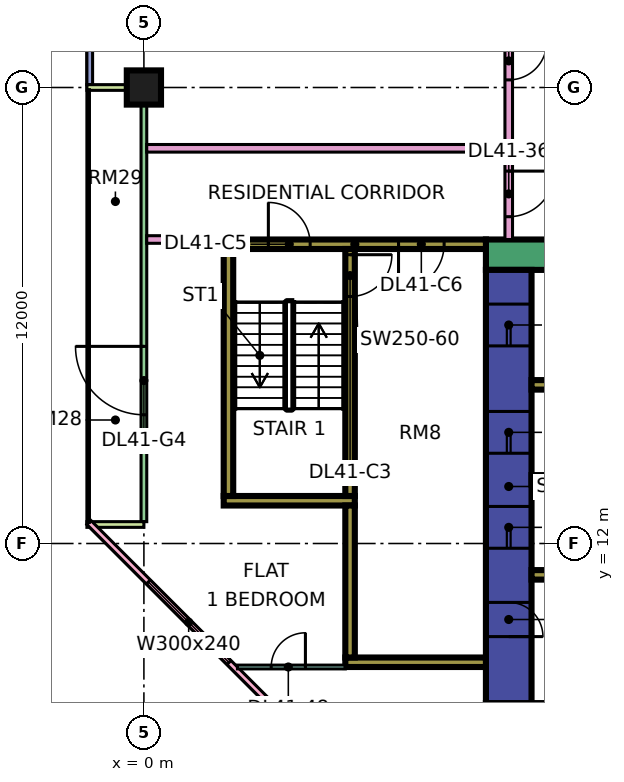
"""IFC4 building model, lengths in metres.
Left out: names, types, materials, properties, quantities, classifications, styles, units other than length and angle.
Written with IfcOpenShell. Run it as: python <this file> out.ifc"""

import sys

from ifc_helpers import new_model, si_unit, direction, frame, frame_2d, origin, origin_2d, place, context, subcontext, project, spatial, rectangle, extrude, element, fill, save


model = new_model("IFC4")
c1 = context("Model", 3, precision=1e-05, world=origin(), true_north=direction((0.0, 1.0)))
c2 = subcontext(c1, "Body", "Model", "MODEL_VIEW")
j1 = project(units=[si_unit("LENGTHUNIT", "METRE"), si_unit("PLANEANGLEUNIT", "RADIAN")], contexts=[c1])
p1 = place(None, origin())
s1 = spatial("IfcSite", under=j1, at=p1, CompositionType="ELEMENT")
p2 = place(p1, origin())
s2 = spatial("IfcBuilding", under=s1, at=p2, CompositionType="ELEMENT")
p3 = place(p2, frame((0.0, 0.0, 179.9)))
s3 = spatial("IfcBuildingStorey", under=s2, at=p3, CompositionType="ELEMENT", Elevation=179.9)
p4 = place(p3, frame((0.0, 24.0, 0.0), z_axis=(0.0, 0.0, 1.0), x_axis=(1.0, 0.0, 0.0)))
e1 = element("IfcColumn", 1, at=p4, inside=s3, PredefinedType="COLUMN", context=c2, shape_type="SweptSolid", body=[
    extrude(rectangle(XDim=0.9, YDim=0.9, at=origin_2d()), origin(), (0.0, 0.0, 1.0), 3.75),
])
p5 = place(p3, frame((9.0, 19.6, 0.0), z_axis=(0.0, 0.0, 1.0), x_axis=(1.0, 0.0, 0.0)))
e2 = element("IfcWall", 2, at=p5, inside=s3, PredefinedType="SHEAR", context=c2, shape_type="SweptSolid", body=[
    extrude(rectangle(XDim=25.0, YDim=0.8, at=frame_2d((12.5, 0.0))), origin(), (0.0, 0.0, 1.0), 3.75),
])
p6 = place(p5, frame((19.1, 0.0, 0.0)))
e3 = element("IfcOpeningElement", 3, at=p6, cuts=e2, PredefinedType="OPENING", context=c2, shape_type="SweptSolid", body=[
    extrude(rectangle(XDim=1.8, YDim=2.4, at=frame_2d((0.9, 1.2))), frame((0.0, 0.41, 0.0), z_axis=(0.0, -1.0, 0.0), x_axis=(1.0, 0.0, 0.0)), (0.0, 0.0, 1.0), 0.82),
])
p7 = place(p3, frame((9.6, 7.8, 0.0), z_axis=(0.0, 0.0, 1.0), x_axis=(0.0, 1.0, 0.0)))
e4 = element("IfcWall", 4, at=p7, inside=s3, PredefinedType="SHEAR", context=c2, shape_type="SweptSolid", body=[
    extrude(rectangle(XDim=11.4, YDim=1.2, at=frame_2d((5.7, 0.0))), origin(), (0.0, 0.0, 1.0), 3.75),
])
p8 = place(p7, frame((4.075, 0.0, 0.0)))
e5 = element("IfcOpeningElement", 5, at=p8, cuts=e4, PredefinedType="OPENING", context=c2, shape_type="SweptSolid", body=[
    extrude(rectangle(XDim=1.1, YDim=2.2, at=frame_2d((0.55, 1.1))), frame((0.0, 0.61, 0.0), z_axis=(0.0, -1.0, 0.0), x_axis=(1.0, 0.0, 0.0)), (0.0, 0.0, 1.0), 1.22),
])
p9 = place(p7, frame((6.575, 0.0, 0.0)))
e6 = element("IfcOpeningElement", 6, at=p9, cuts=e4, PredefinedType="OPENING", context=c2, shape_type="SweptSolid", body=[
    extrude(rectangle(XDim=1.1, YDim=2.2, at=frame_2d((0.55, 1.1))), frame((0.0, 0.61, 0.0), z_axis=(0.0, -1.0, 0.0), x_axis=(1.0, 0.0, 0.0)), (0.0, 0.0, 1.0), 1.22),
])
p10 = place(p7, frame((9.4, 0.0, 0.0)))
e7 = element("IfcOpeningElement", 7, at=p10, cuts=e4, PredefinedType="OPENING", context=c2, shape_type="SweptSolid", body=[
    extrude(rectangle(XDim=1.1, YDim=2.2, at=frame_2d((0.55, 1.1))), frame((0.0, 0.61, 0.0), z_axis=(0.0, -1.0, 0.0), x_axis=(1.0, 0.0, 0.0)), (0.0, 0.0, 1.0), 1.22),
])
p11 = place(p7, frame((1.75, 0.0, 0.0)))
e8 = element("IfcOpeningElement", 8, at=p11, cuts=e4, PredefinedType="OPENING", context=c2, shape_type="SweptSolid", body=[
    extrude(rectangle(XDim=0.9, YDim=2.1, at=frame_2d((0.45, 1.05))), frame((0.0, 0.61, 0.0), z_axis=(0.0, -1.0, 0.0), x_axis=(1.0, 0.0, 0.0)), (0.0, 0.0, 1.0), 1.22),
])
for number, where, z_axis, x_axis in (
    (9, (10.2, 11.175, 0.0), (0.0, 0.0, 1.0), (1.0, 0.0, 0.0)),
    (10, (10.2, 13.675, 0.0), (0.0, 0.0, 1.0), (1.0, 0.0, 0.0)),
    (11, (10.2, 16.175, 0.0), (0.0, 0.0, 1.0), (1.0, 0.0, 0.0)),
):
    element("IfcWall", number, at=place(p3, frame(where, z_axis=z_axis, x_axis=x_axis)), inside=s3, PredefinedType="SHEAR", context=c2, shape_type="SweptSolid", body=[
        extrude(rectangle(XDim=3.0, YDim=0.25, at=frame_2d((1.5, 0.0))), origin(), (0.0, 0.0, 1.0), 3.75),
    ])
p12 = place(p3, frame((2.1, 19.875, 0.0), z_axis=(0.0, 0.0, 1.0), x_axis=(1.0, 0.0, 0.0)))
e12 = element("IfcWall", 12, at=p12, inside=s3, PredefinedType="SHEAR", context=c2, shape_type="SweptSolid", body=[
    extrude(rectangle(XDim=6.9, YDim=0.25, at=frame_2d((3.45, 0.0))), origin(), (0.0, 0.0, 1.0), 3.75),
])
p13 = place(p12, frame((1.175, 0.0, 0.0)))
e13 = element("IfcOpeningElement", 13, at=p13, cuts=e12, PredefinedType="OPENING", context=c2, shape_type="SweptSolid", body=[
    extrude(rectangle(XDim=1.1, YDim=2.2, at=frame_2d((0.55, 1.1))), frame((0.0, 0.135, 0.0), z_axis=(0.0, -1.0, 0.0), x_axis=(1.0, 0.0, 0.0)), (0.0, 0.0, 1.0), 0.27),
])
p14 = place(p12, frame((4.6, 0.0, 0.0)))
e14 = element("IfcOpeningElement", 14, at=p14, cuts=e12, PredefinedType="OPENING", context=c2, shape_type="SweptSolid", body=[
    extrude(rectangle(XDim=1.2, YDim=2.2, at=frame_2d((0.6, 1.1))), frame((0.0, 0.135, 0.0), z_axis=(0.0, -1.0, 0.0), x_axis=(1.0, 0.0, 0.0)), (0.0, 0.0, 1.0), 0.27),
])
p15 = place(p3, frame((2.1, 13.125, 0.0), z_axis=(0.0, 0.0, 1.0), x_axis=(1.0, 0.0, 0.0)))
e15 = element("IfcWall", 15, at=p15, inside=s3, PredefinedType="SHEAR", context=c2, shape_type="SweptSolid", body=[
    extrude(rectangle(XDim=3.45, YDim=0.25, at=frame_2d((1.725, 0.0))), origin(), (0.0, 0.0, 1.0), 3.75),
])
p16 = place(p3, frame((2.225, 13.25, 0.0), z_axis=(0.0, 0.0, 1.0), x_axis=(0.0, 1.0, 0.0)))
e16 = element("IfcWall", 16, at=p16, inside=s3, PredefinedType="SHEAR", context=c2, shape_type="SweptSolid", body=[
    extrude(rectangle(XDim=6.5, YDim=0.25, at=frame_2d((3.25, 0.0))), origin(), (0.0, 0.0, 1.0), 3.75),
])
p17 = place(p3, frame((5.425, 13.25, 0.0), z_axis=(0.0, 0.0, 1.0), x_axis=(0.0, 1.0, 0.0)))
e17 = element("IfcWall", 17, at=p17, inside=s3, PredefinedType="SHEAR", context=c2, shape_type="SweptSolid", body=[
    extrude(rectangle(XDim=6.5, YDim=0.25, at=frame_2d((3.25, 0.0))), origin(), (0.0, 0.0, 1.0), 3.75),
])
p18 = place(p17, frame((5.25, 0.0, 0.0)))
e18 = element("IfcOpeningElement", 18, at=p18, cuts=e17, PredefinedType="OPENING", context=c2, shape_type="SweptSolid", body=[
    extrude(rectangle(XDim=1.1, YDim=2.2, at=frame_2d((0.55, 1.1))), frame((0.0, 0.135, 0.0), z_axis=(0.0, -1.0, 0.0), x_axis=(1.0, 0.0, 0.0)), (0.0, 0.0, 1.0), 0.27),
])
p19 = place(p3, frame((5.3, 8.875, 0.0), z_axis=(0.0, 0.0, 1.0), x_axis=(1.0, 0.0, 0.0)))
e19 = element("IfcWall", 19, at=p19, inside=s3, PredefinedType="SHEAR", context=c2, shape_type="SweptSolid", body=[
    extrude(rectangle(XDim=3.7, YDim=0.25, at=frame_2d((1.85, 0.0))), origin(), (0.0, 0.0, 1.0), 3.75),
])
p20 = place(p3, frame((5.425, 9.0, 0.0), z_axis=(0.0, 0.0, 1.0), x_axis=(0.0, 1.0, 0.0)))
e20 = element("IfcWall", 20, at=p20, inside=s3, PredefinedType="SHEAR", context=c2, shape_type="SweptSolid", body=[
    extrude(rectangle(XDim=4.0, YDim=0.25, at=frame_2d((2.0, 0.0))), origin(), (0.0, 0.0, 1.0), 3.75),
])
p21 = place(p3, frame((-1.425, 35.925, 0.0), z_axis=(0.0, 0.0, 1.0), x_axis=(0.0, -1.0, 0.0)))
e21 = element("IfcWall", 21, at=p21, inside=s3, PredefinedType="SOLIDWALL", context=c2, shape_type="SweptSolid", body=[
    extrude(rectangle(XDim=11.85, YDim=0.15, at=frame_2d((5.925, 0.0))), origin(), (0.0, 0.0, 1.0), 3.35),
])
p22 = place(p21, frame((0.562, 0.0, 0.45)))
e22 = element("IfcOpeningElement", 22, at=p22, cuts=e21, PredefinedType="OPENING", context=c2, shape_type="SweptSolid", body=[
    extrude(rectangle(XDim=1.8, YDim=2.4, at=frame_2d((0.9, 1.2))), frame((0.0, 0.085, 0.0), z_axis=(0.0, -1.0, 0.0), x_axis=(1.0, 0.0, 0.0)), (0.0, 0.0, 1.0), 0.17),
])
p23 = place(p21, frame((3.525, 0.0, 0.45)))
e23 = element("IfcOpeningElement", 23, at=p23, cuts=e21, PredefinedType="OPENING", context=c2, shape_type="SweptSolid", body=[
    extrude(rectangle(XDim=1.8, YDim=2.4, at=frame_2d((0.9, 1.2))), frame((0.0, 0.085, 0.0), z_axis=(0.0, -1.0, 0.0), x_axis=(1.0, 0.0, 0.0)), (0.0, 0.0, 1.0), 0.17),
])
p24 = place(p21, frame((7.387, 0.0, 0.45)))
e24 = element("IfcOpeningElement", 24, at=p24, cuts=e21, PredefinedType="OPENING", context=c2, shape_type="SweptSolid", body=[
    extrude(rectangle(XDim=3.0, YDim=2.4, at=frame_2d((1.5, 1.2))), frame((0.0, 0.085, 0.0), z_axis=(0.0, -1.0, 0.0), x_axis=(1.0, 0.0, 0.0)), (0.0, 0.0, 1.0), 0.17),
])
p25 = place(p3, frame((0.0, 23.925, 0.0), z_axis=(0.0, 0.0, 1.0), x_axis=(0.0, -1.0, 0.0)))
e25 = element("IfcWall", 25, at=p25, inside=s3, PredefinedType="SOLIDWALL", context=c2, shape_type="SweptSolid", body=[
    extrude(rectangle(XDim=11.35, YDim=0.15, at=frame_2d((5.675, 0.0))), origin(), (0.0, 0.0, 1.0), 3.35),
])
p26 = place(p25, frame((6.738, 0.0, 0.0)))
e26 = element("IfcOpeningElement", 26, at=p26, cuts=e25, PredefinedType="OPENING", context=c2, shape_type="SweptSolid", body=[
    extrude(rectangle(XDim=1.8, YDim=2.4, at=frame_2d((0.9, 1.2))), frame((0.0, 0.085, 0.0), z_axis=(0.0, -1.0, 0.0), x_axis=(1.0, 0.0, 0.0)), (0.0, 0.0, 1.0), 0.17),
])
for number, where, z_axis, x_axis in (
    (27, (-1.5, 24.0, 0.0), (0.0, 0.0, 1.0), (1.0, 0.0, 0.0)),
    (28, (-1.5, 12.5, 0.0), (0.0, 0.0, 1.0), (1.0, 0.0, 0.0)),
):
    element("IfcWall", number, at=place(p3, frame(where, z_axis=z_axis, x_axis=x_axis)), inside=s3, PredefinedType="SOLIDWALL", context=c2, shape_type="SweptSolid", body=[
        extrude(rectangle(XDim=1.5, YDim=0.15, at=frame_2d((0.75, 0.0))), origin(), (0.0, 0.0, 1.0), 3.35),
    ])
p27 = place(p3, frame((-1.447, 12.553, 0.0), z_axis=(0.0, 0.0, 1.0), x_axis=(0.707106781187, -0.707106781187, 0.0)))
e29 = element("IfcWall", 29, at=p27, inside=s3, PredefinedType="SOLIDWALL", context=c2, shape_type="SweptSolid", body=[
    extrude(rectangle(XDim=19.799, YDim=0.15, at=frame_2d((9.899, 0.0))), origin(), (0.0, 0.0, 1.0), 3.35),
])
p28 = place(p27, frame((2.212, 0.0, 0.45)))
e30 = element("IfcOpeningElement", 30, at=p28, cuts=e29, PredefinedType="OPENING", context=c2, shape_type="SweptSolid", body=[
    extrude(rectangle(XDim=3.0, YDim=2.4, at=frame_2d((1.5, 1.2))), frame((0.0, 0.085, 0.0), z_axis=(0.0, -1.0, 0.0), x_axis=(1.0, 0.0, 0.0)), (0.0, 0.0, 1.0), 0.17),
])
p29 = place(p27, frame((10.216, 0.0, 0.45)))
e31 = element("IfcOpeningElement", 31, at=p29, cuts=e29, PredefinedType="OPENING", context=c2, shape_type="SweptSolid", body=[
    extrude(rectangle(XDim=3.0, YDim=2.4, at=frame_2d((1.5, 1.2))), frame((0.0, 0.085, 0.0), z_axis=(0.0, -1.0, 0.0), x_axis=(1.0, 0.0, 0.0)), (0.0, 0.0, 1.0), 0.17),
])
p30 = place(p3, frame((0.074, 20.0, 0.0), z_axis=(0.0, 0.0, 1.0), x_axis=(1.0, 0.0, 0.0)))
e32 = element("IfcWall", 32, at=p30, inside=s3, PredefinedType="PARTITIONING", context=c2, shape_type="SweptSolid", body=[
    extrude(rectangle(XDim=2.026, YDim=0.2, at=frame_2d((1.013, 0.0))), origin(), (0.0, 0.0, 1.0), 3.35),
])
p31 = place(p3, frame((0.074, 22.4, 0.0), z_axis=(0.0, 0.0, 1.0), x_axis=(1.0, 0.0, 0.0)))
e33 = element("IfcWall", 33, at=p31, inside=s3, PredefinedType="PARTITIONING", context=c2, shape_type="SweptSolid", body=[
    extrude(rectangle(XDim=9.426, YDim=0.2, at=frame_2d((4.713, 0.0))), origin(), (0.0, 0.0, 1.0), 3.35),
])
p32 = place(p3, frame((2.461, 8.75, 0.0), z_axis=(0.0, 0.0, 1.0), x_axis=(1.0, 0.0, 0.0)))
e34 = element("IfcWall", 34, at=p32, inside=s3, PredefinedType="PARTITIONING", context=c2, shape_type="SweptSolid", body=[
    extrude(rectangle(XDim=2.839, YDim=0.1, at=frame_2d((1.419, 0.0))), origin(), (0.0, 0.0, 1.0), 3.35),
])
p33 = place(p32, frame((0.889, 0.0, 0.0)))
e35 = element("IfcOpeningElement", 35, at=p33, cuts=e34, PredefinedType="OPENING", context=c2, shape_type="SweptSolid", body=[
    extrude(rectangle(XDim=0.9, YDim=2.1, at=frame_2d((0.45, 1.05))), frame((0.0, 0.06, 0.0), z_axis=(0.0, -1.0, 0.0), x_axis=(1.0, 0.0, 0.0)), (0.0, 0.0, 1.0), 0.12),
])
p34 = place(p3, frame((9.6, 20.0, 0.0), z_axis=(0.0, 0.0, 1.0), x_axis=(0.0, 1.0, 0.0)))
e36 = element("IfcWall", 36, at=p34, inside=s3, PredefinedType="PARTITIONING", context=c2, shape_type="SweptSolid", body=[
    extrude(rectangle(XDim=44.35, YDim=0.2, at=frame_2d((22.175, 0.0))), origin(), (0.0, 0.0, 1.0), 3.35),
])
p35 = place(p34, frame((16.8, 0.0, 0.0)))
e37 = element("IfcOpeningElement", 37, at=p35, cuts=e36, PredefinedType="OPENING", context=c2, shape_type="SweptSolid", body=[
    extrude(rectangle(XDim=1.0, YDim=2.1, at=frame_2d((0.5, 1.05))), frame((0.0, 0.11, 0.0), z_axis=(0.0, -1.0, 0.0), x_axis=(1.0, 0.0, 0.0)), (0.0, 0.0, 1.0), 0.22),
])
p36 = place(p34, frame((40.65, 0.0, 0.0)))
e38 = element("IfcOpeningElement", 38, at=p36, cuts=e36, PredefinedType="OPENING", context=c2, shape_type="SweptSolid", body=[
    extrude(rectangle(XDim=1.0, YDim=2.1, at=frame_2d((0.5, 1.05))), frame((0.0, 0.11, 0.0), z_axis=(0.0, -1.0, 0.0), x_axis=(1.0, 0.0, 0.0)), (0.0, 0.0, 1.0), 0.22),
])
p37 = place(p34, frame((0.6, 0.0, 0.0)))
e39 = element("IfcOpeningElement", 39, at=p37, cuts=e36, PredefinedType="OPENING", context=c2, shape_type="SweptSolid", body=[
    extrude(rectangle(XDim=1.2, YDim=2.1, at=frame_2d((0.6, 1.05))), frame((0.0, 0.11, 0.0), z_axis=(0.0, -1.0, 0.0), x_axis=(1.0, 0.0, 0.0)), (0.0, 0.0, 1.0), 0.22),
])
p38 = place(p34, frame((4.2, 0.0, 0.0)))
e40 = element("IfcOpeningElement", 40, at=p38, cuts=e36, PredefinedType="OPENING", context=c2, shape_type="SweptSolid", body=[
    extrude(rectangle(XDim=1.0, YDim=2.1, at=frame_2d((0.5, 1.05))), frame((0.0, 0.11, 0.0), z_axis=(0.0, -1.0, 0.0), x_axis=(1.0, 0.0, 0.0)), (0.0, 0.0, 1.0), 0.22),
])
p39 = place(p26, frame((1.8, 0.0, 0.0), z_axis=(0.0, 0.0, 1.0), x_axis=(-1.0, 0.0, 0.0)))
e41 = element("IfcDoor", 41, at=p39, inside=s3, OperationType="DOUBLE_DOOR_SINGLE_SWING", PredefinedType="DOOR", context=c2, shape_type="SweptSolid", body=[
    extrude(rectangle(XDim=1.8, YDim=2.4, at=frame_2d((0.9, 1.2))), frame((0.0, 0.025, 0.0), z_axis=(0.0, -1.0, 0.0), x_axis=(1.0, 0.0, 0.0)), (0.0, 0.0, 1.0), 0.05),
])
fill(e26, e41)
p40 = place(p28, origin())
e42 = element("IfcWindow", 42, at=p40, inside=s3, PartitioningType="SINGLE_PANEL", PredefinedType="WINDOW", context=c2, shape_type="SweptSolid", body=[
    extrude(rectangle(XDim=3.0, YDim=2.4, at=frame_2d((1.5, 1.2))), frame((0.0, 0.03, 0.0), z_axis=(0.0, -1.0, 0.0), x_axis=(1.0, 0.0, 0.0)), (0.0, 0.0, 1.0), 0.06),
])
fill(e30, e42)
p41 = place(p8, origin())
e43 = element("IfcDoor", 43, at=p41, inside=s3, OperationType="DOUBLE_DOOR_SLIDING", PredefinedType="DOOR", context=c2, shape_type="SweptSolid", body=[
    extrude(rectangle(XDim=1.1, YDim=2.2, at=frame_2d((0.55, 1.1))), frame((0.0, 0.025, 0.0), z_axis=(0.0, -1.0, 0.0), x_axis=(1.0, 0.0, 0.0)), (0.0, 0.0, 1.0), 0.05),
])
fill(e5, e43)
p42 = place(p9, origin())
e44 = element("IfcDoor", 44, at=p42, inside=s3, OperationType="DOUBLE_DOOR_SLIDING", PredefinedType="DOOR", context=c2, shape_type="SweptSolid", body=[
    extrude(rectangle(XDim=1.1, YDim=2.2, at=frame_2d((0.55, 1.1))), frame((0.0, 0.025, 0.0), z_axis=(0.0, -1.0, 0.0), x_axis=(1.0, 0.0, 0.0)), (0.0, 0.0, 1.0), 0.05),
])
fill(e6, e44)
p43 = place(p10, origin())
e45 = element("IfcDoor", 45, at=p43, inside=s3, OperationType="DOUBLE_DOOR_SLIDING", PredefinedType="DOOR", context=c2, shape_type="SweptSolid", body=[
    extrude(rectangle(XDim=1.1, YDim=2.2, at=frame_2d((0.55, 1.1))), frame((0.0, 0.025, 0.0), z_axis=(0.0, -1.0, 0.0), x_axis=(1.0, 0.0, 0.0)), (0.0, 0.0, 1.0), 0.05),
])
fill(e7, e45)
p44 = place(p18, origin())
e46 = element("IfcDoor", 46, at=p44, inside=s3, OperationType="SINGLE_SWING_RIGHT", PredefinedType="DOOR", context=c2, shape_type="SweptSolid", body=[
    extrude(rectangle(XDim=1.1, YDim=2.2, at=frame_2d((0.55, 1.1))), frame((0.0, 0.025, 0.0), z_axis=(0.0, -1.0, 0.0), x_axis=(1.0, 0.0, 0.0)), (0.0, 0.0, 1.0), 0.05),
])
fill(e18, e46)
p45 = place(p11, frame((0.9, 0.0, 0.0), z_axis=(0.0, 0.0, 1.0), x_axis=(-1.0, 0.0, 0.0)))
e47 = element("IfcDoor", 47, at=p45, inside=s3, OperationType="SINGLE_SWING_LEFT", PredefinedType="DOOR", context=c2, shape_type="SweptSolid", body=[
    extrude(rectangle(XDim=0.9, YDim=2.1, at=frame_2d((0.45, 1.05))), frame((0.0, 0.025, 0.0), z_axis=(0.0, -1.0, 0.0), x_axis=(1.0, 0.0, 0.0)), (0.0, 0.0, 1.0), 0.05),
])
fill(e8, e47)
p46 = place(p13, origin())
e48 = element("IfcDoor", 48, at=p46, inside=s3, OperationType="SINGLE_SWING_LEFT", PredefinedType="DOOR", context=c2, shape_type="SweptSolid", body=[
    extrude(rectangle(XDim=1.1, YDim=2.2, at=frame_2d((0.55, 1.1))), frame((0.0, 0.025, 0.0), z_axis=(0.0, -1.0, 0.0), x_axis=(1.0, 0.0, 0.0)), (0.0, 0.0, 1.0), 0.05),
])
fill(e13, e48)
p47 = place(p14, frame((1.2, 0.0, 0.0), z_axis=(0.0, 0.0, 1.0), x_axis=(-1.0, 0.0, 0.0)))
e49 = element("IfcDoor", 49, at=p47, inside=s3, OperationType="SINGLE_SWING_LEFT", PredefinedType="DOOR", context=c2, shape_type="SweptSolid", body=[
    extrude(rectangle(XDim=1.2, YDim=2.2, at=frame_2d((0.6, 1.1))), frame((0.0, 0.025, 0.0), z_axis=(0.0, -1.0, 0.0), x_axis=(1.0, 0.0, 0.0)), (0.0, 0.0, 1.0), 0.05),
])
fill(e14, e49)
p48 = place(p37, origin())
e50 = element("IfcDoor", 50, at=p48, inside=s3, OperationType="SINGLE_SWING_RIGHT", PredefinedType="DOOR", context=c2, shape_type="SweptSolid", body=[
    extrude(rectangle(XDim=1.2, YDim=2.1, at=frame_2d((0.6, 1.05))), frame((0.0, 0.025, 0.0), z_axis=(0.0, -1.0, 0.0), x_axis=(1.0, 0.0, 0.0)), (0.0, 0.0, 1.0), 0.05),
])
fill(e39, e50)
p49 = place(p33, frame((0.9, 0.0, 0.0), z_axis=(0.0, 0.0, 1.0), x_axis=(-1.0, 0.0, 0.0)))
e51 = element("IfcDoor", 51, at=p49, inside=s3, OperationType="SINGLE_SWING_RIGHT", PredefinedType="DOOR", context=c2, shape_type="SweptSolid", body=[
    extrude(rectangle(XDim=0.9, YDim=2.1, at=frame_2d((0.45, 1.05))), frame((0.0, 0.025, 0.0), z_axis=(0.0, -1.0, 0.0), x_axis=(1.0, 0.0, 0.0)), (0.0, 0.0, 1.0), 0.05),
])
fill(e35, e51)
p50 = place(p38, origin())
e52 = element("IfcDoor", 52, at=p50, inside=s3, OperationType="SINGLE_SWING_RIGHT", PredefinedType="DOOR", context=c2, shape_type="SweptSolid", body=[
    extrude(rectangle(XDim=1.0, YDim=2.1, at=frame_2d((0.5, 1.05))), frame((0.0, 0.025, 0.0), z_axis=(0.0, -1.0, 0.0), x_axis=(1.0, 0.0, 0.0)), (0.0, 0.0, 1.0), 0.05),
])
fill(e40, e52)
save(model, sys.argv[1])
